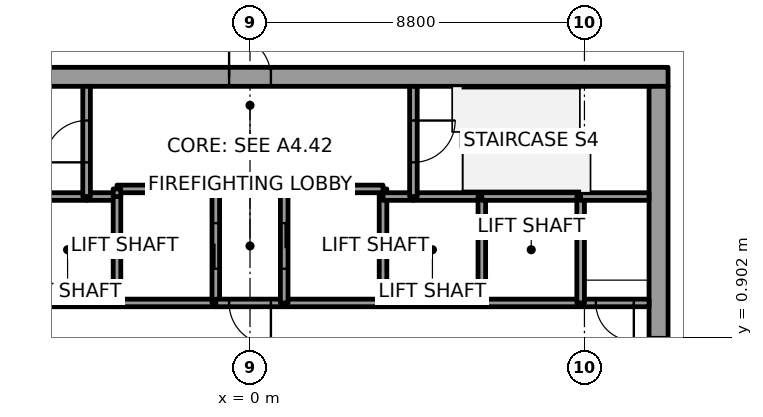
"""IFC4 building model, lengths in metres.
Left out: names, types, materials, properties, quantities, classifications, styles, units other than length and angle.
Written with IfcOpenShell. Run it as: python <this file> out.ifc"""

import sys

from ifc_helpers import new_model, si_unit, direction, frame, frame_2d, origin, place, context, subcontext, project, spatial, rectangle, extrude, element, fill, save


model = new_model("IFC4")
c1 = context("Model", 3, precision=1e-05, world=origin(), true_north=direction((0.0, 1.0)))
c2 = subcontext(c1, "Body", "Model", "MODEL_VIEW")
j1 = project(units=[si_unit("LENGTHUNIT", "METRE"), si_unit("PLANEANGLEUNIT", "RADIAN")], contexts=[c1])
p1 = place(None, origin())
s1 = spatial("IfcSite", under=j1, at=p1, CompositionType="ELEMENT")
p2 = place(p1, origin())
s2 = spatial("IfcBuilding", under=s1, at=p2, CompositionType="ELEMENT")
p3 = place(p2, frame((0.0, 0.0, 181.8)))
s3 = spatial("IfcBuildingStorey", under=s2, at=p3, CompositionType="ELEMENT", Elevation=181.8)
p4 = place(p3, frame((-11.0, 7.75, 0.0), z_axis=(0.0, 0.0, 1.0), x_axis=(1.0, 0.0, 0.0)))
e1 = element("IfcWall", 1, at=p4, inside=s3, PredefinedType="SHEAR", context=c2, shape_type="SweptSolid", body=[
    extrude(rectangle(XDim=22.0, YDim=0.5, at=frame_2d((11.0, 0.0))), origin(), (0.0, 0.0, 1.0), 4.0),
])
p5 = place(p4, frame((10.45, 0.0, 0.0)))
e2 = element("IfcOpeningElement", 2, at=p5, cuts=e1, PredefinedType="OPENING", context=c2, shape_type="SweptSolid", body=[
    extrude(rectangle(XDim=1.1, YDim=2.1, at=frame_2d((0.55, 1.05))), frame((0.0, 0.25, 0.0), z_axis=(0.0, -1.0, 0.0), x_axis=(1.0, 0.0, 0.0)), (0.0, 0.0, 1.0), 0.5),
])
p6 = place(p3, frame((10.75, -7.5, 0.0), z_axis=(0.0, 0.0, 1.0), x_axis=(0.0, 1.0, 0.0)))
e3 = element("IfcWall", 3, at=p6, inside=s3, PredefinedType="SHEAR", context=c2, shape_type="SweptSolid", body=[
    extrude(rectangle(XDim=15.0, YDim=0.5, at=frame_2d((7.5, 0.0))), origin(), (0.0, 0.0, 1.0), 4.0),
])
p7 = place(p6, frame((6.6, 0.0, 0.0)))
e4 = element("IfcOpeningElement", 4, at=p7, cuts=e3, PredefinedType="OPENING", context=c2, shape_type="SweptSolid", body=[
    extrude(rectangle(XDim=1.8, YDim=2.1, at=frame_2d((0.9, 1.05))), frame((0.0, 0.25, 0.0), z_axis=(0.0, -1.0, 0.0), x_axis=(1.0, 0.0, 0.0)), (0.0, 0.0, 1.0), 0.5),
])
p8 = place(p3, frame((-3.5, 1.8, 0.0), z_axis=(0.0, 0.0, 1.0), x_axis=(-1.0, 0.0, 0.0)))
e5 = element("IfcWall", 5, at=p8, inside=s3, PredefinedType="SOLIDWALL", context=c2, shape_type="SweptSolid", body=[
    extrude(rectangle(XDim=2.6, YDim=0.2, at=frame_2d((1.3, 0.0))), origin(), (0.0, 0.0, 1.0), 3.85),
])
p9 = place(p3, frame((-4.3, 4.6, 0.0), z_axis=(0.0, 0.0, 1.0), x_axis=(-1.0, 0.0, 0.0)))
e6 = element("IfcWall", 6, at=p9, inside=s3, PredefinedType="SOLIDWALL", context=c2, shape_type="SweptSolid", body=[
    extrude(rectangle(XDim=1.8, YDim=0.2, at=frame_2d((0.9, 0.0))), origin(), (0.0, 0.0, 1.0), 3.85),
])
p10 = place(p3, frame((-3.5, 4.6, 0.0), z_axis=(0.0, 0.0, 1.0), x_axis=(-1.0, 0.0, 0.0)))
e7 = element("IfcWall", 7, at=p10, inside=s3, PredefinedType="SOLIDWALL", context=c2, shape_type="SweptSolid", body=[
    extrude(rectangle(XDim=0.8, YDim=0.2, at=frame_2d((0.4, 0.0))), origin(), (0.0, 0.0, 1.0), 3.85),
])
p11 = place(p3, frame((-4.3, 4.6, 0.0), z_axis=(0.0, 0.0, 1.0), x_axis=(0.0, 1.0, 0.0)))
e8 = element("IfcWall", 8, at=p11, inside=s3, PredefinedType="SOLIDWALL", context=c2, shape_type="SweptSolid", body=[
    extrude(rectangle(XDim=2.9, YDim=0.2, at=frame_2d((1.45, 0.0))), origin(), (0.0, 0.0, 1.0), 3.85),
])
p12 = place(p11, frame((0.9, 0.0, 0.0)))
e9 = element("IfcOpeningElement", 9, at=p12, cuts=e8, PredefinedType="OPENING", context=c2, shape_type="SweptSolid", body=[
    extrude(rectangle(XDim=1.1, YDim=2.1, at=frame_2d((0.55, 1.05))), frame((0.0, 0.1, 0.0), z_axis=(0.0, -1.0, 0.0), x_axis=(1.0, 0.0, 0.0)), (0.0, 0.0, 1.0), 0.2),
])
p13 = place(p3, frame((-0.9, 1.8, 0.0), z_axis=(0.0, 0.0, 1.0), x_axis=(-1.0, 0.0, 0.0)))
e10 = element("IfcWall", 10, at=p13, inside=s3, PredefinedType="SOLIDWALL", context=c2, shape_type="SweptSolid", body=[
    extrude(rectangle(XDim=2.6, YDim=0.2, at=frame_2d((1.3, 0.0))), origin(), (0.0, 0.0, 1.0), 3.85),
])
p14 = place(p3, frame((-3.5, 4.6, 0.0), z_axis=(0.0, 0.0, 1.0), x_axis=(0.0, -1.0, 0.0)))
e11 = element("IfcWall", 11, at=p14, inside=s3, PredefinedType="SOLIDWALL", context=c2, shape_type="SweptSolid", body=[
    extrude(rectangle(XDim=2.8, YDim=0.2, at=frame_2d((1.4, 0.0))), origin(), (0.0, 0.0, 1.0), 3.85),
])
p15 = place(p3, frame((-0.9, 1.8, 0.0), z_axis=(0.0, 0.0, 1.0), x_axis=(0.0, 1.0, 0.0)))
e12 = element("IfcWall", 12, at=p15, inside=s3, PredefinedType="SOLIDWALL", context=c2, shape_type="SweptSolid", body=[
    extrude(rectangle(XDim=3.0, YDim=0.2, at=frame_2d((1.5, 0.0))), origin(), (0.0, 0.0, 1.0), 3.85),
])
p16 = place(p15, frame((0.9, 0.0, 0.0)))
e13 = element("IfcOpeningElement", 13, at=p16, cuts=e12, PredefinedType="OPENING", context=c2, shape_type="SweptSolid", body=[
    extrude(rectangle(XDim=1.2, YDim=2.1, at=frame_2d((0.6, 1.05))), frame((0.0, 0.1, 0.0), z_axis=(0.0, -1.0, 0.0), x_axis=(1.0, 0.0, 0.0)), (0.0, 0.0, 1.0), 0.2),
])
p17 = place(p3, frame((-0.9, 4.8, 0.0), z_axis=(0.0, 0.0, 1.0), x_axis=(-1.0, 0.0, 0.0)))
e14 = element("IfcWall", 14, at=p17, inside=s3, PredefinedType="SOLIDWALL", context=c2, shape_type="SweptSolid", body=[
    extrude(rectangle(XDim=2.6, YDim=0.2, at=frame_2d((1.3, 0.0))), origin(), (0.0, 0.0, 1.0), 3.85),
])
p18 = place(p3, frame((-3.5, 4.8, 0.0), z_axis=(0.0, 0.0, 1.0), x_axis=(0.0, -1.0, 0.0)))
e15 = element("IfcWall", 15, at=p18, inside=s3, PredefinedType="SOLIDWALL", context=c2, shape_type="SweptSolid", body=[
    extrude(rectangle(XDim=0.2, YDim=0.2, at=frame_2d((0.1, 0.0))), origin(), (0.0, 0.0, 1.0), 3.85),
])
p19 = place(p3, frame((0.9, 1.8, 0.0), z_axis=(0.0, 0.0, 1.0), x_axis=(-1.0, 0.0, 0.0)))
e16 = element("IfcWall", 16, at=p19, inside=s3, PredefinedType="SOLIDWALL", context=c2, shape_type="SweptSolid", body=[
    extrude(rectangle(XDim=1.8, YDim=0.2, at=frame_2d((0.9, 0.0))), origin(), (0.0, 0.0, 1.0), 3.85),
])
p20 = place(p19, frame((0.35, 0.0, 0.0)))
e17 = element("IfcOpeningElement", 17, at=p20, cuts=e16, PredefinedType="OPENING", context=c2, shape_type="SweptSolid", body=[
    extrude(rectangle(XDim=1.1, YDim=2.1, at=frame_2d((0.55, 1.05))), frame((0.0, 0.1, 0.0), z_axis=(0.0, -1.0, 0.0), x_axis=(1.0, 0.0, 0.0)), (0.0, 0.0, 1.0), 0.2),
])
p21 = place(p3, frame((3.5, 1.8, 0.0), z_axis=(0.0, 0.0, 1.0), x_axis=(-1.0, 0.0, 0.0)))
e18 = element("IfcWall", 18, at=p21, inside=s3, PredefinedType="SOLIDWALL", context=c2, shape_type="SweptSolid", body=[
    extrude(rectangle(XDim=2.6, YDim=0.2, at=frame_2d((1.3, 0.0))), origin(), (0.0, 0.0, 1.0), 3.85),
])
p22 = place(p3, frame((3.5, 4.6, 0.0), z_axis=(0.0, 0.0, 1.0), x_axis=(0.0, 1.0, 0.0)))
e19 = element("IfcWall", 19, at=p22, inside=s3, PredefinedType="SOLIDWALL", context=c2, shape_type="SweptSolid", body=[
    extrude(rectangle(XDim=0.2, YDim=0.2, at=frame_2d((0.1, 0.0))), origin(), (0.0, 0.0, 1.0), 3.85),
])
p23 = place(p3, frame((3.5, 4.8, 0.0), z_axis=(0.0, 0.0, 1.0), x_axis=(-1.0, 0.0, 0.0)))
e20 = element("IfcWall", 20, at=p23, inside=s3, PredefinedType="SOLIDWALL", context=c2, shape_type="SweptSolid", body=[
    extrude(rectangle(XDim=2.6, YDim=0.2, at=frame_2d((1.3, 0.0))), origin(), (0.0, 0.0, 1.0), 3.85),
])
p24 = place(p3, frame((0.9, 4.8, 0.0), z_axis=(0.0, 0.0, 1.0), x_axis=(0.0, -1.0, 0.0)))
e21 = element("IfcWall", 21, at=p24, inside=s3, PredefinedType="SOLIDWALL", context=c2, shape_type="SweptSolid", body=[
    extrude(rectangle(XDim=3.0, YDim=0.2, at=frame_2d((1.5, 0.0))), origin(), (0.0, 0.0, 1.0), 3.85),
])
p25 = place(p24, frame((0.9, 0.0, 0.0)))
e22 = element("IfcOpeningElement", 22, at=p25, cuts=e21, PredefinedType="OPENING", context=c2, shape_type="SweptSolid", body=[
    extrude(rectangle(XDim=1.2, YDim=2.1, at=frame_2d((0.6, 1.05))), frame((0.0, 0.1, 0.0), z_axis=(0.0, -1.0, 0.0), x_axis=(1.0, 0.0, 0.0)), (0.0, 0.0, 1.0), 0.2),
])
p26 = place(p3, frame((6.1, 1.8, 0.0), z_axis=(0.0, 0.0, 1.0), x_axis=(-1.0, 0.0, 0.0)))
e23 = element("IfcWall", 23, at=p26, inside=s3, PredefinedType="SOLIDWALL", context=c2, shape_type="SweptSolid", body=[
    extrude(rectangle(XDim=2.6, YDim=0.2, at=frame_2d((1.3, 0.0))), origin(), (0.0, 0.0, 1.0), 3.85),
])
p27 = place(p3, frame((3.5, 1.8, 0.0), z_axis=(0.0, 0.0, 1.0), x_axis=(0.0, 1.0, 0.0)))
e24 = element("IfcWall", 24, at=p27, inside=s3, PredefinedType="SOLIDWALL", context=c2, shape_type="SweptSolid", body=[
    extrude(rectangle(XDim=2.8, YDim=0.2, at=frame_2d((1.4, 0.0))), origin(), (0.0, 0.0, 1.0), 3.85),
])
p28 = place(p3, frame((4.3, 4.6, 0.0), z_axis=(0.0, 0.0, 1.0), x_axis=(-1.0, 0.0, 0.0)))
e25 = element("IfcWall", 25, at=p28, inside=s3, PredefinedType="SOLIDWALL", context=c2, shape_type="SweptSolid", body=[
    extrude(rectangle(XDim=0.8, YDim=0.2, at=frame_2d((0.4, 0.0))), origin(), (0.0, 0.0, 1.0), 3.85),
])
p29 = place(p3, frame((6.1, 4.6, 0.0), z_axis=(0.0, 0.0, 1.0), x_axis=(-1.0, 0.0, 0.0)))
e26 = element("IfcWall", 26, at=p29, inside=s3, PredefinedType="SOLIDWALL", context=c2, shape_type="SweptSolid", body=[
    extrude(rectangle(XDim=1.8, YDim=0.2, at=frame_2d((0.9, 0.0))), origin(), (0.0, 0.0, 1.0), 3.85),
])
p30 = place(p3, frame((4.3, 7.5, 0.0), z_axis=(0.0, 0.0, 1.0), x_axis=(0.0, -1.0, 0.0)))
e27 = element("IfcWall", 27, at=p30, inside=s3, PredefinedType="SOLIDWALL", context=c2, shape_type="SweptSolid", body=[
    extrude(rectangle(XDim=2.9, YDim=0.2, at=frame_2d((1.45, 0.0))), origin(), (0.0, 0.0, 1.0), 3.85),
])
p31 = place(p30, frame((0.9, 0.0, 0.0)))
e28 = element("IfcOpeningElement", 28, at=p31, cuts=e27, PredefinedType="OPENING", context=c2, shape_type="SweptSolid", body=[
    extrude(rectangle(XDim=1.1, YDim=2.1, at=frame_2d((0.55, 1.05))), frame((0.0, 0.1, 0.0), z_axis=(0.0, -1.0, 0.0), x_axis=(1.0, 0.0, 0.0)), (0.0, 0.0, 1.0), 0.2),
])
p32 = place(p3, frame((8.7, 1.8, 0.0), z_axis=(0.0, 0.0, 1.0), x_axis=(-1.0, 0.0, 0.0)))
e29 = element("IfcWall", 29, at=p32, inside=s3, PredefinedType="SOLIDWALL", context=c2, shape_type="SweptSolid", body=[
    extrude(rectangle(XDim=2.6, YDim=0.2, at=frame_2d((1.3, 0.0))), origin(), (0.0, 0.0, 1.0), 3.85),
])
p33 = place(p3, frame((6.1, 1.8, 0.0), z_axis=(0.0, 0.0, 1.0), x_axis=(0.0, 1.0, 0.0)))
e30 = element("IfcWall", 30, at=p33, inside=s3, PredefinedType="SOLIDWALL", context=c2, shape_type="SweptSolid", body=[
    extrude(rectangle(XDim=2.8, YDim=0.2, at=frame_2d((1.4, 0.0))), origin(), (0.0, 0.0, 1.0), 3.85),
])
p34 = place(p3, frame((8.7, 4.6, 0.0), z_axis=(0.0, 0.0, 1.0), x_axis=(-1.0, 0.0, 0.0)))
e31 = element("IfcWall", 31, at=p34, inside=s3, PredefinedType="SOLIDWALL", context=c2, shape_type="SweptSolid", body=[
    extrude(rectangle(XDim=2.6, YDim=0.2, at=frame_2d((1.3, 0.0))), origin(), (0.0, 0.0, 1.0), 3.85),
])
p35 = place(p3, frame((10.5, 1.8, 0.0), z_axis=(0.0, 0.0, 1.0), x_axis=(-1.0, 0.0, 0.0)))
e32 = element("IfcWall", 32, at=p35, inside=s3, PredefinedType="SOLIDWALL", context=c2, shape_type="SweptSolid", body=[
    extrude(rectangle(XDim=1.8, YDim=0.2, at=frame_2d((0.9, 0.0))), origin(), (0.0, 0.0, 1.0), 3.85),
])
p36 = place(p35, frame((0.4, 0.0, 0.0)))
e33 = element("IfcOpeningElement", 33, at=p36, cuts=e32, PredefinedType="OPENING", context=c2, shape_type="SweptSolid", body=[
    extrude(rectangle(XDim=1.0, YDim=2.1, at=frame_2d((0.5, 1.05))), frame((0.0, 0.1, 0.0), z_axis=(0.0, -1.0, 0.0), x_axis=(1.0, 0.0, 0.0)), (0.0, 0.0, 1.0), 0.2),
])
p37 = place(p3, frame((8.7, 4.6, 0.0), z_axis=(0.0, 0.0, 1.0), x_axis=(0.0, -1.0, 0.0)))
e34 = element("IfcWall", 34, at=p37, inside=s3, PredefinedType="SOLIDWALL", context=c2, shape_type="SweptSolid", body=[
    extrude(rectangle(XDim=2.8, YDim=0.2, at=frame_2d((1.4, 0.0))), origin(), (0.0, 0.0, 1.0), 3.85),
])
p38 = place(p3, frame((10.5, 4.6, 0.0), z_axis=(0.0, 0.0, 1.0), x_axis=(-1.0, 0.0, 0.0)))
e35 = element("IfcWall", 35, at=p38, inside=s3, PredefinedType="SOLIDWALL", context=c2, shape_type="SweptSolid", body=[
    extrude(rectangle(XDim=1.8, YDim=0.2, at=frame_2d((0.9, 0.0))), origin(), (0.0, 0.0, 1.0), 3.85),
])
p39 = place(p16, origin())
e36 = element("IfcDoor", 36, at=p39, inside=s3, OperationType="SLIDING_TO_RIGHT", PredefinedType="DOOR", context=c2, shape_type="SweptSolid", body=[
    extrude(rectangle(XDim=1.2, YDim=2.1, at=frame_2d((0.6, 1.05))), frame((0.0, 0.025, 0.0), z_axis=(0.0, -1.0, 0.0), x_axis=(1.0, 0.0, 0.0)), (0.0, 0.0, 1.0), 0.05),
])
fill(e13, e36)
p40 = place(p25, origin())
e37 = element("IfcDoor", 37, at=p40, inside=s3, OperationType="SLIDING_TO_LEFT", PredefinedType="DOOR", context=c2, shape_type="SweptSolid", body=[
    extrude(rectangle(XDim=1.2, YDim=2.1, at=frame_2d((0.6, 1.05))), frame((0.0, 0.025, 0.0), z_axis=(0.0, -1.0, 0.0), x_axis=(1.0, 0.0, 0.0)), (0.0, 0.0, 1.0), 0.05),
])
fill(e22, e37)
p41 = place(p20, origin())
e38 = element("IfcDoor", 38, at=p41, inside=s3, OperationType="SINGLE_SWING_LEFT", PredefinedType="DOOR", context=c2, shape_type="SweptSolid", body=[
    extrude(rectangle(XDim=1.1, YDim=2.1, at=frame_2d((0.55, 1.05))), frame((0.0, 0.025, 0.0), z_axis=(0.0, -1.0, 0.0), x_axis=(1.0, 0.0, 0.0)), (0.0, 0.0, 1.0), 0.05),
])
fill(e17, e38)
p42 = place(p36, origin())
e39 = element("IfcDoor", 39, at=p42, inside=s3, OperationType="SINGLE_SWING_LEFT", PredefinedType="DOOR", context=c2, shape_type="SweptSolid", body=[
    extrude(rectangle(XDim=1.0, YDim=2.1, at=frame_2d((0.5, 1.05))), frame((0.0, 0.025, 0.0), z_axis=(0.0, -1.0, 0.0), x_axis=(1.0, 0.0, 0.0)), (0.0, 0.0, 1.0), 0.05),
])
fill(e33, e39)
p43 = place(p12, origin())
e40 = element("IfcDoor", 40, at=p43, inside=s3, OperationType="SINGLE_SWING_LEFT", PredefinedType="DOOR", context=c2, shape_type="SweptSolid", body=[
    extrude(rectangle(XDim=1.1, YDim=2.1, at=frame_2d((0.55, 1.05))), frame((0.0, 0.025, 0.0), z_axis=(0.0, -1.0, 0.0), x_axis=(1.0, 0.0, 0.0)), (0.0, 0.0, 1.0), 0.05),
])
fill(e9, e40)
p44 = place(p31, origin())
e41 = element("IfcDoor", 41, at=p44, inside=s3, OperationType="SINGLE_SWING_LEFT", PredefinedType="DOOR", context=c2, shape_type="SweptSolid", body=[
    extrude(rectangle(XDim=1.1, YDim=2.1, at=frame_2d((0.55, 1.05))), frame((0.0, 0.025, 0.0), z_axis=(0.0, -1.0, 0.0), x_axis=(1.0, 0.0, 0.0)), (0.0, 0.0, 1.0), 0.05),
])
fill(e28, e41)
p45 = place(p7, origin())
e42 = element("IfcDoor", 42, at=p45, inside=s3, OperationType="DOUBLE_DOOR_SINGLE_SWING", PredefinedType="DOOR", context=c2, shape_type="SweptSolid", body=[
    extrude(rectangle(XDim=1.8, YDim=2.1, at=frame_2d((0.9, 1.05))), frame((0.0, 0.025, 0.0), z_axis=(0.0, -1.0, 0.0), x_axis=(1.0, 0.0, 0.0)), (0.0, 0.0, 1.0), 0.05),
])
fill(e4, e42)
p46 = place(p5, origin())
e43 = element("IfcDoor", 43, at=p46, inside=s3, OperationType="SINGLE_SWING_RIGHT", PredefinedType="DOOR", context=c2, shape_type="SweptSolid", body=[
    extrude(rectangle(XDim=1.1, YDim=2.1, at=frame_2d((0.55, 1.05))), frame((0.0, 0.025, 0.0), z_axis=(0.0, -1.0, 0.0), x_axis=(1.0, 0.0, 0.0)), (0.0, 0.0, 1.0), 0.05),
])
fill(e2, e43)
save(model, sys.argv[1])
